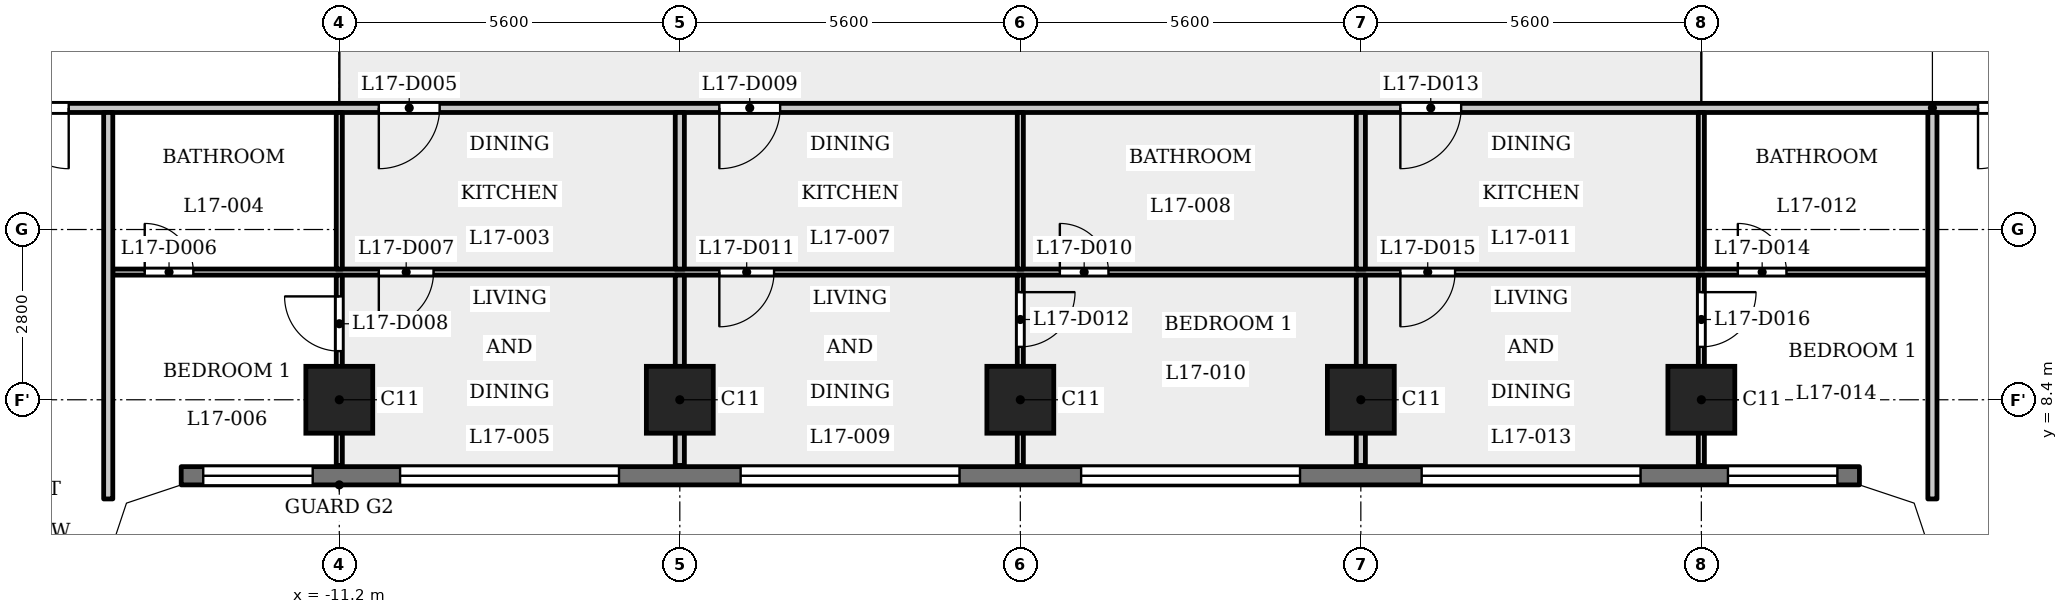
"""IFC4 building model, lengths in metres.
Left out: names, types, materials, properties, quantities, classifications, styles, units other than length and angle.
Written with IfcOpenShell. Run it as: python <this file> out.ifc"""

import sys

from ifc_helpers import new_model, si_unit, direction, frame, frame_2d, origin, origin_2d, place, context, subcontext, project, spatial, polyline, rectangle, outline, extrude, element, fill, save


model = new_model("IFC4")
c1 = context("Model", 3, precision=1e-05, world=origin(), true_north=direction((0.0, 1.0)))
c2 = subcontext(c1, "Body", "Model", "MODEL_VIEW")
j1 = project(units=[si_unit("LENGTHUNIT", "METRE"), si_unit("PLANEANGLEUNIT", "RADIAN")], contexts=[c1])
p1 = place(None, origin())
s1 = spatial("IfcSite", under=j1, at=p1, CompositionType="ELEMENT")
p2 = place(p1, origin())
s2 = spatial("IfcBuilding", under=s1, at=p2, CompositionType="ELEMENT")
p3 = place(p2, frame((0.0, 0.0, 69.0)))
s3 = spatial("IfcBuildingStorey", under=s2, at=p3, CompositionType="ELEMENT", Elevation=69.0)
for number, where, z_axis, x_axis in (
    (1, (-11.2, 8.4, 0.0), (0.0, 0.0, 1.0), (1.0, 0.0, 0.0)),
    (2, (-5.6, 8.4, 0.0), (0.0, 0.0, 1.0), (1.0, 0.0, 0.0)),
    (3, (0.0, 8.4, 0.0), (0.0, 0.0, 1.0), (1.0, 0.0, 0.0)),
    (4, (5.6, 8.4, 0.0), (0.0, 0.0, 1.0), (1.0, 0.0, 0.0)),
    (5, (11.2, 8.4, 0.0), (0.0, 0.0, 1.0), (1.0, 0.0, 0.0)),
):
    element("IfcColumn", number, at=place(p3, frame(where, z_axis=z_axis, x_axis=x_axis)), inside=s3, PredefinedType="COLUMN", context=c2, shape_type="SweptSolid", body=[
        extrude(rectangle(XDim=1.1, YDim=1.1, at=origin_2d()), origin(), (0.0, 0.0, 1.0), 3.5),
    ])
p4 = place(p3, frame((-13.8, 7.15, 0.0), z_axis=(0.0, 0.0, 1.0), x_axis=(1.0, 0.0, 0.0)))
e6 = element("IfcWall", 6, at=p4, inside=s3, PredefinedType="SOLIDWALL", context=c2, shape_type="SweptSolid", body=[
    extrude(rectangle(XDim=27.6, YDim=0.3, at=frame_2d((13.8, 0.0))), origin(), (0.0, 0.0, 1.0), 3.15),
])
p5 = place(p4, frame((0.363, 0.0, 0.9)))
e7 = element("IfcOpeningElement", 7, at=p5, cuts=e6, PredefinedType="OPENING", context=c2, shape_type="SweptSolid", body=[
    extrude(rectangle(XDim=1.8, YDim=1.25, at=frame_2d((0.9, 0.625))), frame((0.0, 0.16, 0.0), z_axis=(0.0, -1.0, 0.0), x_axis=(1.0, 0.0, 0.0)), (0.0, 0.0, 1.0), 0.32),
])
p6 = place(p4, frame((3.6, 0.0, 1.2)))
e8 = element("IfcOpeningElement", 8, at=p6, cuts=e6, PredefinedType="OPENING", context=c2, shape_type="SweptSolid", body=[
    extrude(rectangle(XDim=3.6, YDim=0.95, at=frame_2d((1.8, 0.475))), frame((0.0, 0.16, 0.0), z_axis=(0.0, -1.0, 0.0), x_axis=(1.0, 0.0, 0.0)), (0.0, 0.0, 1.0), 0.32),
])
p7 = place(p4, frame((9.2, 0.0, 1.2)))
e9 = element("IfcOpeningElement", 9, at=p7, cuts=e6, PredefinedType="OPENING", context=c2, shape_type="SweptSolid", body=[
    extrude(rectangle(XDim=3.6, YDim=0.95, at=frame_2d((1.8, 0.475))), frame((0.0, 0.16, 0.0), z_axis=(0.0, -1.0, 0.0), x_axis=(1.0, 0.0, 0.0)), (0.0, 0.0, 1.0), 0.32),
])
p8 = place(p4, frame((14.8, 0.0, 1.2)))
e10 = element("IfcOpeningElement", 10, at=p8, cuts=e6, PredefinedType="OPENING", context=c2, shape_type="SweptSolid", body=[
    extrude(rectangle(XDim=3.6, YDim=0.95, at=frame_2d((1.8, 0.475))), frame((0.0, 0.16, 0.0), z_axis=(0.0, -1.0, 0.0), x_axis=(1.0, 0.0, 0.0)), (0.0, 0.0, 1.0), 0.32),
])
p9 = place(p4, frame((20.4, 0.0, 1.2)))
e11 = element("IfcOpeningElement", 11, at=p9, cuts=e6, PredefinedType="OPENING", context=c2, shape_type="SweptSolid", body=[
    extrude(rectangle(XDim=3.6, YDim=0.95, at=frame_2d((1.8, 0.475))), frame((0.0, 0.16, 0.0), z_axis=(0.0, -1.0, 0.0), x_axis=(1.0, 0.0, 0.0)), (0.0, 0.0, 1.0), 0.32),
])
p10 = place(p4, frame((25.438, 0.0, 0.9)))
e12 = element("IfcOpeningElement", 12, at=p10, cuts=e6, PredefinedType="OPENING", context=c2, shape_type="SweptSolid", body=[
    extrude(rectangle(XDim=1.8, YDim=1.25, at=frame_2d((0.9, 0.625))), frame((0.0, 0.16, 0.0), z_axis=(0.0, -1.0, 0.0), x_axis=(1.0, 0.0, 0.0)), (0.0, 0.0, 1.0), 0.32),
])
p11 = place(p3, frame((-14.925, 10.5, 0.0), z_axis=(0.0, 0.0, 1.0), x_axis=(1.0, 0.0, 0.0)))
e13 = element("IfcWall", 13, at=p11, inside=s3, PredefinedType="PARTITIONING", context=c2, shape_type="SweptSolid", body=[
    extrude(rectangle(XDim=29.85, YDim=0.1, at=frame_2d((14.925, 0.0))), origin(), (0.0, 0.0, 1.0), 3.15),
])
p12 = place(p11, frame((0.525, 0.0, 0.0)))
e14 = element("IfcOpeningElement", 14, at=p12, cuts=e13, PredefinedType="OPENING", context=c2, shape_type="SweptSolid", body=[
    extrude(rectangle(XDim=0.8, YDim=2.1, at=frame_2d((0.4, 1.05))), frame((0.0, 0.06, 0.0), z_axis=(0.0, -1.0, 0.0), x_axis=(1.0, 0.0, 0.0)), (0.0, 0.0, 1.0), 0.12),
])
p13 = place(p11, frame((4.375, 0.0, 0.0)))
e15 = element("IfcOpeningElement", 15, at=p13, cuts=e13, PredefinedType="OPENING", context=c2, shape_type="SweptSolid", body=[
    extrude(rectangle(XDim=0.9, YDim=2.1, at=frame_2d((0.45, 1.05))), frame((0.0, 0.06, 0.0), z_axis=(0.0, -1.0, 0.0), x_axis=(1.0, 0.0, 0.0)), (0.0, 0.0, 1.0), 0.12),
])
p14 = place(p11, frame((15.575, 0.0, 0.0)))
e16 = element("IfcOpeningElement", 16, at=p14, cuts=e13, PredefinedType="OPENING", context=c2, shape_type="SweptSolid", body=[
    extrude(rectangle(XDim=0.8, YDim=2.1, at=frame_2d((0.4, 1.05))), frame((0.0, 0.06, 0.0), z_axis=(0.0, -1.0, 0.0), x_axis=(1.0, 0.0, 0.0)), (0.0, 0.0, 1.0), 0.12),
])
p15 = place(p11, frame((9.975, 0.0, 0.0)))
e17 = element("IfcOpeningElement", 17, at=p15, cuts=e13, PredefinedType="OPENING", context=c2, shape_type="SweptSolid", body=[
    extrude(rectangle(XDim=0.9, YDim=2.1, at=frame_2d((0.45, 1.05))), frame((0.0, 0.06, 0.0), z_axis=(0.0, -1.0, 0.0), x_axis=(1.0, 0.0, 0.0)), (0.0, 0.0, 1.0), 0.12),
])
p16 = place(p11, frame((26.725, 0.0, 0.0)))
e18 = element("IfcOpeningElement", 18, at=p16, cuts=e13, PredefinedType="OPENING", context=c2, shape_type="SweptSolid", body=[
    extrude(rectangle(XDim=0.8, YDim=2.1, at=frame_2d((0.4, 1.05))), frame((0.0, 0.06, 0.0), z_axis=(0.0, -1.0, 0.0), x_axis=(1.0, 0.0, 0.0)), (0.0, 0.0, 1.0), 0.12),
])
p17 = place(p11, frame((21.175, 0.0, 0.0)))
e19 = element("IfcOpeningElement", 19, at=p17, cuts=e13, PredefinedType="OPENING", context=c2, shape_type="SweptSolid", body=[
    extrude(rectangle(XDim=0.9, YDim=2.1, at=frame_2d((0.45, 1.05))), frame((0.0, 0.06, 0.0), z_axis=(0.0, -1.0, 0.0), x_axis=(1.0, 0.0, 0.0)), (0.0, 0.0, 1.0), 0.12),
])
p18 = place(p3, frame((-17.4, 13.2, 0.0), z_axis=(0.0, 0.0, 1.0), x_axis=(1.0, 0.0, 0.0)))
e20 = element("IfcWall", 20, at=p18, inside=s3, PredefinedType="PARTITIONING", context=c2, shape_type="SweptSolid", body=[
    extrude(rectangle(XDim=34.8, YDim=0.15, at=frame_2d((17.4, 0.0))), origin(), (0.0, 0.0, 1.0), 3.15),
])
p19 = place(p18, frame((0.75, 0.0, 0.0)))
e21 = element("IfcOpeningElement", 21, at=p19, cuts=e20, PredefinedType="OPENING", context=c2, shape_type="SweptSolid", body=[
    extrude(rectangle(XDim=1.0, YDim=2.1, at=frame_2d((0.5, 1.05))), frame((0.0, 0.085, 0.0), z_axis=(0.0, -1.0, 0.0), x_axis=(1.0, 0.0, 0.0)), (0.0, 0.0, 1.0), 0.17),
])
p20 = place(p18, frame((33.15, 0.0, 0.0)))
e22 = element("IfcOpeningElement", 22, at=p20, cuts=e20, PredefinedType="OPENING", context=c2, shape_type="SweptSolid", body=[
    extrude(rectangle(XDim=1.0, YDim=2.1, at=frame_2d((0.5, 1.05))), frame((0.0, 0.085, 0.0), z_axis=(0.0, -1.0, 0.0), x_axis=(1.0, 0.0, 0.0)), (0.0, 0.0, 1.0), 0.17),
])
p21 = place(p18, frame((6.85, 0.0, 0.0)))
e23 = element("IfcOpeningElement", 23, at=p21, cuts=e20, PredefinedType="OPENING", context=c2, shape_type="SweptSolid", body=[
    extrude(rectangle(XDim=1.0, YDim=2.1, at=frame_2d((0.5, 1.05))), frame((0.0, 0.085, 0.0), z_axis=(0.0, -1.0, 0.0), x_axis=(1.0, 0.0, 0.0)), (0.0, 0.0, 1.0), 0.17),
])
p22 = place(p18, frame((12.45, 0.0, 0.0)))
e24 = element("IfcOpeningElement", 24, at=p22, cuts=e20, PredefinedType="OPENING", context=c2, shape_type="SweptSolid", body=[
    extrude(rectangle(XDim=1.0, YDim=2.1, at=frame_2d((0.5, 1.05))), frame((0.0, 0.085, 0.0), z_axis=(0.0, -1.0, 0.0), x_axis=(1.0, 0.0, 0.0)), (0.0, 0.0, 1.0), 0.17),
])
p23 = place(p18, frame((23.65, 0.0, 0.0)))
e25 = element("IfcOpeningElement", 25, at=p23, cuts=e20, PredefinedType="OPENING", context=c2, shape_type="SweptSolid", body=[
    extrude(rectangle(XDim=1.0, YDim=2.1, at=frame_2d((0.5, 1.05))), frame((0.0, 0.085, 0.0), z_axis=(0.0, -1.0, 0.0), x_axis=(1.0, 0.0, 0.0)), (0.0, 0.0, 1.0), 0.17),
])
p24 = place(p3, frame((-15.0, 6.769, 0.0), z_axis=(0.0, 0.0, 1.0), x_axis=(0.0, 1.0, 0.0)))
e26 = element("IfcWall", 26, at=p24, inside=s3, PredefinedType="PARTITIONING", context=c2, shape_type="SweptSolid", body=[
    extrude(rectangle(XDim=6.356, YDim=0.15, at=frame_2d((3.178, 0.0))), origin(), (0.0, 0.0, 1.0), 3.15),
])
p25 = place(p3, frame((-11.2, 7.32, 0.0), z_axis=(0.0, 0.0, 1.0), x_axis=(0.0, 1.0, 0.0)))
e27 = element("IfcWall", 27, at=p25, inside=s3, PredefinedType="PARTITIONING", context=c2, shape_type="SweptSolid", body=[
    extrude(rectangle(XDim=3.13, YDim=0.1, at=frame_2d((1.565, 0.0))), origin(), (0.0, 0.0, 1.0), 3.15),
])
p26 = place(p25, frame((1.88, 0.0, 0.0)))
e28 = element("IfcOpeningElement", 28, at=p26, cuts=e27, PredefinedType="OPENING", context=c2, shape_type="SweptSolid", body=[
    extrude(rectangle(XDim=0.9, YDim=2.1, at=frame_2d((0.45, 1.05))), frame((0.0, 0.06, 0.0), z_axis=(0.0, -1.0, 0.0), x_axis=(1.0, 0.0, 0.0)), (0.0, 0.0, 1.0), 0.12),
])
p27 = place(p3, frame((-11.2, 10.55, 0.0), z_axis=(0.0, 0.0, 1.0), x_axis=(0.0, 1.0, 0.0)))
e29 = element("IfcWall", 29, at=p27, inside=s3, PredefinedType="PARTITIONING", context=c2, shape_type="SweptSolid", body=[
    extrude(rectangle(XDim=2.575, YDim=0.1, at=frame_2d((1.288, 0.0))), origin(), (0.0, 0.0, 1.0), 3.15),
])
p28 = place(p3, frame((-5.6, 7.32, 0.0), z_axis=(0.0, 0.0, 1.0), x_axis=(0.0, 1.0, 0.0)))
e30 = element("IfcWall", 30, at=p28, inside=s3, PredefinedType="PARTITIONING", context=c2, shape_type="SweptSolid", body=[
    extrude(rectangle(XDim=3.13, YDim=0.15, at=frame_2d((1.565, 0.0))), origin(), (0.0, 0.0, 1.0), 3.15),
])
p29 = place(p3, frame((-5.6, 10.55, 0.0), z_axis=(0.0, 0.0, 1.0), x_axis=(0.0, 1.0, 0.0)))
e31 = element("IfcWall", 31, at=p29, inside=s3, PredefinedType="PARTITIONING", context=c2, shape_type="SweptSolid", body=[
    extrude(rectangle(XDim=2.575, YDim=0.15, at=frame_2d((1.288, 0.0))), origin(), (0.0, 0.0, 1.0), 3.15),
])
p30 = place(p3, frame((0.0, 7.32, 0.0), z_axis=(0.0, 0.0, 1.0), x_axis=(0.0, 1.0, 0.0)))
e32 = element("IfcWall", 32, at=p30, inside=s3, PredefinedType="PARTITIONING", context=c2, shape_type="SweptSolid", body=[
    extrude(rectangle(XDim=3.13, YDim=0.1, at=frame_2d((1.565, 0.0))), origin(), (0.0, 0.0, 1.0), 3.15),
])
p31 = place(p30, frame((1.95, 0.0, 0.0)))
e33 = element("IfcOpeningElement", 33, at=p31, cuts=e32, PredefinedType="OPENING", context=c2, shape_type="SweptSolid", body=[
    extrude(rectangle(XDim=0.9, YDim=2.1, at=frame_2d((0.45, 1.05))), frame((0.0, 0.06, 0.0), z_axis=(0.0, -1.0, 0.0), x_axis=(1.0, 0.0, 0.0)), (0.0, 0.0, 1.0), 0.12),
])
p32 = place(p3, frame((0.0, 10.55, 0.0), z_axis=(0.0, 0.0, 1.0), x_axis=(0.0, 1.0, 0.0)))
e34 = element("IfcWall", 34, at=p32, inside=s3, PredefinedType="PARTITIONING", context=c2, shape_type="SweptSolid", body=[
    extrude(rectangle(XDim=2.575, YDim=0.1, at=frame_2d((1.288, 0.0))), origin(), (0.0, 0.0, 1.0), 3.15),
])
p33 = place(p3, frame((5.6, 7.32, 0.0), z_axis=(0.0, 0.0, 1.0), x_axis=(0.0, 1.0, 0.0)))
e35 = element("IfcWall", 35, at=p33, inside=s3, PredefinedType="PARTITIONING", context=c2, shape_type="SweptSolid", body=[
    extrude(rectangle(XDim=3.13, YDim=0.15, at=frame_2d((1.565, 0.0))), origin(), (0.0, 0.0, 1.0), 3.15),
])
p34 = place(p3, frame((5.6, 10.55, 0.0), z_axis=(0.0, 0.0, 1.0), x_axis=(0.0, 1.0, 0.0)))
e36 = element("IfcWall", 36, at=p34, inside=s3, PredefinedType="PARTITIONING", context=c2, shape_type="SweptSolid", body=[
    extrude(rectangle(XDim=2.575, YDim=0.15, at=frame_2d((1.288, 0.0))), origin(), (0.0, 0.0, 1.0), 3.15),
])
p35 = place(p3, frame((11.2, 7.32, 0.0), z_axis=(0.0, 0.0, 1.0), x_axis=(0.0, 1.0, 0.0)))
e37 = element("IfcWall", 37, at=p35, inside=s3, PredefinedType="PARTITIONING", context=c2, shape_type="SweptSolid", body=[
    extrude(rectangle(XDim=3.13, YDim=0.1, at=frame_2d((1.565, 0.0))), origin(), (0.0, 0.0, 1.0), 3.15),
])
p36 = place(p35, frame((1.95, 0.0, 0.0)))
e38 = element("IfcOpeningElement", 38, at=p36, cuts=e37, PredefinedType="OPENING", context=c2, shape_type="SweptSolid", body=[
    extrude(rectangle(XDim=0.9, YDim=2.1, at=frame_2d((0.45, 1.05))), frame((0.0, 0.06, 0.0), z_axis=(0.0, -1.0, 0.0), x_axis=(1.0, 0.0, 0.0)), (0.0, 0.0, 1.0), 0.12),
])
p37 = place(p3, frame((11.2, 10.55, 0.0), z_axis=(0.0, 0.0, 1.0), x_axis=(0.0, 1.0, 0.0)))
e39 = element("IfcWall", 39, at=p37, inside=s3, PredefinedType="PARTITIONING", context=c2, shape_type="SweptSolid", body=[
    extrude(rectangle(XDim=2.575, YDim=0.1, at=frame_2d((1.288, 0.0))), origin(), (0.0, 0.0, 1.0), 3.15),
])
p38 = place(p3, frame((15.0, 6.769, 0.0), z_axis=(0.0, 0.0, 1.0), x_axis=(0.0, 1.0, 0.0)))
e40 = element("IfcWall", 40, at=p38, inside=s3, PredefinedType="PARTITIONING", context=c2, shape_type="SweptSolid", body=[
    extrude(rectangle(XDim=6.356, YDim=0.15, at=frame_2d((3.178, 0.0))), origin(), (0.0, 0.0, 1.0), 3.15),
])
p39 = place(p3, origin())
e41 = element("IfcWall", 41, at=p39, inside=s3, PredefinedType="SOLIDWALL", context=c2, shape_type="SweptSolid", body=[
    extrude(outline(polyline([(-13.849, 7.3), (-14.937, 6.937), (-15.3, 5.849), (-15.3, 5.8), (-15.0, 5.8), (-14.7, 6.7), (-13.8, 7.0), (-13.8, 7.3), (-13.849, 7.3)])), origin(), (0.0, 0.0, 1.0), 3.15),
])
e42 = element("IfcWall", 42, at=p39, inside=s3, PredefinedType="SOLIDWALL", context=c2, shape_type="SweptSolid", body=[
    extrude(outline(polyline([(14.937, 6.937), (13.849, 7.3), (13.8, 7.3), (13.8, 7.0), (14.7, 6.7), (15.0, 5.8), (15.3, 5.8), (15.3, 5.849), (14.937, 6.937)])), origin(), (0.0, 0.0, 1.0), 3.15),
])
p40 = place(p19, origin())
e43 = element("IfcDoor", 43, at=p40, inside=s3, OperationType="SINGLE_SWING_RIGHT", PredefinedType="DOOR", context=c2, shape_type="SweptSolid", body=[
    extrude(rectangle(XDim=1.0, YDim=2.1, at=frame_2d((0.5, 1.05))), frame((0.0, 0.025, 0.0), z_axis=(0.0, -1.0, 0.0), x_axis=(1.0, 0.0, 0.0)), (0.0, 0.0, 1.0), 0.05),
])
fill(e21, e43)
p41 = place(p20, origin())
e44 = element("IfcDoor", 44, at=p41, inside=s3, OperationType="SINGLE_SWING_LEFT", PredefinedType="DOOR", context=c2, shape_type="SweptSolid", body=[
    extrude(rectangle(XDim=1.0, YDim=2.1, at=frame_2d((0.5, 1.05))), frame((0.0, 0.025, 0.0), z_axis=(0.0, -1.0, 0.0), x_axis=(1.0, 0.0, 0.0)), (0.0, 0.0, 1.0), 0.05),
])
fill(e22, e44)
p42 = place(p21, origin())
e45 = element("IfcDoor", 45, at=p42, inside=s3, OperationType="SINGLE_SWING_LEFT", PredefinedType="DOOR", context=c2, shape_type="SweptSolid", body=[
    extrude(rectangle(XDim=1.0, YDim=2.1, at=frame_2d((0.5, 1.05))), frame((0.0, 0.025, 0.0), z_axis=(0.0, -1.0, 0.0), x_axis=(1.0, 0.0, 0.0)), (0.0, 0.0, 1.0), 0.05),
])
fill(e23, e45)
p43 = place(p12, origin())
e46 = element("IfcDoor", 46, at=p43, inside=s3, OperationType="SINGLE_SWING_RIGHT", PredefinedType="DOOR", context=c2, shape_type="SweptSolid", body=[
    extrude(rectangle(XDim=0.8, YDim=2.1, at=frame_2d((0.4, 1.05))), frame((0.0, 0.025, 0.0), z_axis=(0.0, -1.0, 0.0), x_axis=(1.0, 0.0, 0.0)), (0.0, 0.0, 1.0), 0.05),
])
fill(e14, e46)
p44 = place(p13, origin())
e47 = element("IfcDoor", 47, at=p44, inside=s3, OperationType="SINGLE_SWING_LEFT", PredefinedType="DOOR", context=c2, shape_type="SweptSolid", body=[
    extrude(rectangle(XDim=0.9, YDim=2.1, at=frame_2d((0.45, 1.05))), frame((0.0, 0.025, 0.0), z_axis=(0.0, -1.0, 0.0), x_axis=(1.0, 0.0, 0.0)), (0.0, 0.0, 1.0), 0.05),
])
fill(e15, e47)
p45 = place(p26, origin())
e48 = element("IfcDoor", 48, at=p45, inside=s3, OperationType="SINGLE_SWING_LEFT", PredefinedType="DOOR", context=c2, shape_type="SweptSolid", body=[
    extrude(rectangle(XDim=0.9, YDim=2.1, at=frame_2d((0.45, 1.05))), frame((0.0, 0.025, 0.0), z_axis=(0.0, -1.0, 0.0), x_axis=(1.0, 0.0, 0.0)), (0.0, 0.0, 1.0), 0.05),
])
fill(e28, e48)
p46 = place(p22, origin())
e49 = element("IfcDoor", 49, at=p46, inside=s3, OperationType="SINGLE_SWING_LEFT", PredefinedType="DOOR", context=c2, shape_type="SweptSolid", body=[
    extrude(rectangle(XDim=1.0, YDim=2.1, at=frame_2d((0.5, 1.05))), frame((0.0, 0.025, 0.0), z_axis=(0.0, -1.0, 0.0), x_axis=(1.0, 0.0, 0.0)), (0.0, 0.0, 1.0), 0.05),
])
fill(e24, e49)
p47 = place(p14, origin())
e50 = element("IfcDoor", 50, at=p47, inside=s3, OperationType="SINGLE_SWING_RIGHT", PredefinedType="DOOR", context=c2, shape_type="SweptSolid", body=[
    extrude(rectangle(XDim=0.8, YDim=2.1, at=frame_2d((0.4, 1.05))), frame((0.0, 0.025, 0.0), z_axis=(0.0, -1.0, 0.0), x_axis=(1.0, 0.0, 0.0)), (0.0, 0.0, 1.0), 0.05),
])
fill(e16, e50)
p48 = place(p15, origin())
e51 = element("IfcDoor", 51, at=p48, inside=s3, OperationType="SINGLE_SWING_LEFT", PredefinedType="DOOR", context=c2, shape_type="SweptSolid", body=[
    extrude(rectangle(XDim=0.9, YDim=2.1, at=frame_2d((0.45, 1.05))), frame((0.0, 0.025, 0.0), z_axis=(0.0, -1.0, 0.0), x_axis=(1.0, 0.0, 0.0)), (0.0, 0.0, 1.0), 0.05),
])
fill(e17, e51)
p49 = place(p31, origin())
e52 = element("IfcDoor", 52, at=p49, inside=s3, OperationType="SINGLE_SWING_RIGHT", PredefinedType="DOOR", context=c2, shape_type="SweptSolid", body=[
    extrude(rectangle(XDim=0.9, YDim=2.1, at=frame_2d((0.45, 1.05))), frame((0.0, 0.025, 0.0), z_axis=(0.0, -1.0, 0.0), x_axis=(1.0, 0.0, 0.0)), (0.0, 0.0, 1.0), 0.05),
])
fill(e33, e52)
p50 = place(p23, origin())
e53 = element("IfcDoor", 53, at=p50, inside=s3, OperationType="SINGLE_SWING_LEFT", PredefinedType="DOOR", context=c2, shape_type="SweptSolid", body=[
    extrude(rectangle(XDim=1.0, YDim=2.1, at=frame_2d((0.5, 1.05))), frame((0.0, 0.025, 0.0), z_axis=(0.0, -1.0, 0.0), x_axis=(1.0, 0.0, 0.0)), (0.0, 0.0, 1.0), 0.05),
])
fill(e25, e53)
p51 = place(p16, origin())
e54 = element("IfcDoor", 54, at=p51, inside=s3, OperationType="SINGLE_SWING_RIGHT", PredefinedType="DOOR", context=c2, shape_type="SweptSolid", body=[
    extrude(rectangle(XDim=0.8, YDim=2.1, at=frame_2d((0.4, 1.05))), frame((0.0, 0.025, 0.0), z_axis=(0.0, -1.0, 0.0), x_axis=(1.0, 0.0, 0.0)), (0.0, 0.0, 1.0), 0.05),
])
fill(e18, e54)
p52 = place(p17, origin())
e55 = element("IfcDoor", 55, at=p52, inside=s3, OperationType="SINGLE_SWING_LEFT", PredefinedType="DOOR", context=c2, shape_type="SweptSolid", body=[
    extrude(rectangle(XDim=0.9, YDim=2.1, at=frame_2d((0.45, 1.05))), frame((0.0, 0.025, 0.0), z_axis=(0.0, -1.0, 0.0), x_axis=(1.0, 0.0, 0.0)), (0.0, 0.0, 1.0), 0.05),
])
fill(e19, e55)
p53 = place(p36, origin())
e56 = element("IfcDoor", 56, at=p53, inside=s3, OperationType="SINGLE_SWING_RIGHT", PredefinedType="DOOR", context=c2, shape_type="SweptSolid", body=[
    extrude(rectangle(XDim=0.9, YDim=2.1, at=frame_2d((0.45, 1.05))), frame((0.0, 0.025, 0.0), z_axis=(0.0, -1.0, 0.0), x_axis=(1.0, 0.0, 0.0)), (0.0, 0.0, 1.0), 0.05),
])
fill(e38, e56)
p54 = place(p5, origin())
e57 = element("IfcWindow", 57, at=p54, inside=s3, PartitioningType="SINGLE_PANEL", PredefinedType="WINDOW", context=c2, shape_type="SweptSolid", body=[
    extrude(rectangle(XDim=1.8, YDim=1.25, at=frame_2d((0.9, 0.625))), frame((0.0, 0.03, 0.0), z_axis=(0.0, -1.0, 0.0), x_axis=(1.0, 0.0, 0.0)), (0.0, 0.0, 1.0), 0.06),
])
fill(e7, e57)
p55 = place(p6, origin())
e58 = element("IfcWindow", 58, at=p55, inside=s3, PartitioningType="SINGLE_PANEL", PredefinedType="WINDOW", context=c2, shape_type="SweptSolid", body=[
    extrude(rectangle(XDim=3.6, YDim=0.95, at=frame_2d((1.8, 0.475))), frame((0.0, 0.03, 0.0), z_axis=(0.0, -1.0, 0.0), x_axis=(1.0, 0.0, 0.0)), (0.0, 0.0, 1.0), 0.06),
])
fill(e8, e58)
p56 = place(p7, origin())
e59 = element("IfcWindow", 59, at=p56, inside=s3, PartitioningType="SINGLE_PANEL", PredefinedType="WINDOW", context=c2, shape_type="SweptSolid", body=[
    extrude(rectangle(XDim=3.6, YDim=0.95, at=frame_2d((1.8, 0.475))), frame((0.0, 0.03, 0.0), z_axis=(0.0, -1.0, 0.0), x_axis=(1.0, 0.0, 0.0)), (0.0, 0.0, 1.0), 0.06),
])
fill(e9, e59)
p57 = place(p8, origin())
e60 = element("IfcWindow", 60, at=p57, inside=s3, PartitioningType="SINGLE_PANEL", PredefinedType="WINDOW", context=c2, shape_type="SweptSolid", body=[
    extrude(rectangle(XDim=3.6, YDim=0.95, at=frame_2d((1.8, 0.475))), frame((0.0, 0.03, 0.0), z_axis=(0.0, -1.0, 0.0), x_axis=(1.0, 0.0, 0.0)), (0.0, 0.0, 1.0), 0.06),
])
fill(e10, e60)
p58 = place(p9, origin())
e61 = element("IfcWindow", 61, at=p58, inside=s3, PartitioningType="SINGLE_PANEL", PredefinedType="WINDOW", context=c2, shape_type="SweptSolid", body=[
    extrude(rectangle(XDim=3.6, YDim=0.95, at=frame_2d((1.8, 0.475))), frame((0.0, 0.03, 0.0), z_axis=(0.0, -1.0, 0.0), x_axis=(1.0, 0.0, 0.0)), (0.0, 0.0, 1.0), 0.06),
])
fill(e11, e61)
p59 = place(p10, origin())
e62 = element("IfcWindow", 62, at=p59, inside=s3, PartitioningType="SINGLE_PANEL", PredefinedType="WINDOW", context=c2, shape_type="SweptSolid", body=[
    extrude(rectangle(XDim=1.8, YDim=1.25, at=frame_2d((0.9, 0.625))), frame((0.0, 0.03, 0.0), z_axis=(0.0, -1.0, 0.0), x_axis=(1.0, 0.0, 0.0)), (0.0, 0.0, 1.0), 0.06),
])
fill(e12, e62)
save(model, sys.argv[1])
